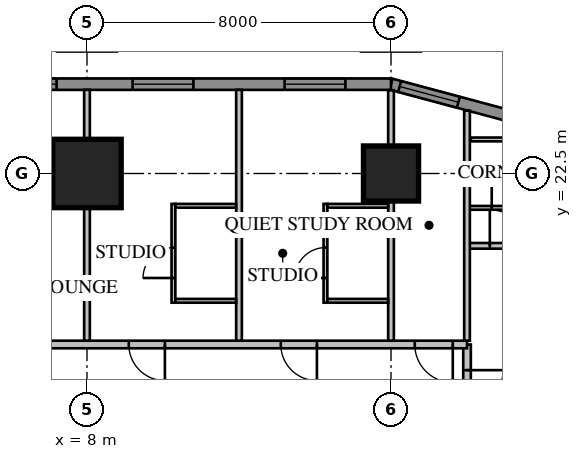
"""IFC4 building model, lengths in metres.
Left out: names, types, materials, properties, quantities, classifications, styles, units other than length and angle.
Written with IfcOpenShell. Run it as: python <this file> out.ifc"""

import sys

from ifc_helpers import new_model, si_unit, direction, frame, frame_2d, origin, origin_2d, place, context, subcontext, project, spatial, rectangle, extrude, element, fill, save


model = new_model("IFC4")
c1 = context("Model", 3, precision=1e-05, world=origin(), true_north=direction((0.0, 1.0)))
c2 = subcontext(c1, "Body", "Model", "MODEL_VIEW")
j1 = project(units=[si_unit("LENGTHUNIT", "METRE"), si_unit("PLANEANGLEUNIT", "RADIAN")], contexts=[c1])
p1 = place(None, origin())
s1 = spatial("IfcSite", under=j1, at=p1, CompositionType="ELEMENT")
p2 = place(p1, origin())
s2 = spatial("IfcBuilding", under=s1, at=p2, CompositionType="ELEMENT")
p3 = place(p2, frame((0.0, 0.0, 46.8)))
s3 = spatial("IfcBuildingStorey", under=s2, at=p3, CompositionType="ELEMENT", Elevation=46.8)
p4 = place(p3, frame((16.0, 22.5, 0.0), z_axis=(0.0, 0.0, 1.0), x_axis=(1.0, 0.0, 0.0)))
e1 = element("IfcColumn", 1, at=p4, inside=s3, PredefinedType="COLUMN", context=c2, shape_type="SweptSolid", body=[
    extrude(rectangle(XDim=1.45, YDim=1.45, at=origin_2d()), origin(), (0.0, 0.0, 1.0), 3.85),
])
p5 = place(p3, frame((8.0, 22.5, 0.0), z_axis=(0.0, 0.0, 1.0), x_axis=(1.0, 0.0, 0.0)))
e2 = element("IfcColumn", 2, at=p5, inside=s3, PredefinedType="COLUMN", context=c2, shape_type="SweptSolid", body=[
    extrude(rectangle(XDim=1.8, YDim=1.8, at=origin_2d()), origin(), (0.0, 0.0, 1.0), 3.85),
])
p6 = place(p3, frame((20.425, 23.664, 0.0), z_axis=(0.0, 0.0, 1.0), x_axis=(-0.965920218567, 0.258839972501, 0.0)))
e3 = element("IfcWall", 3, at=p6, inside=s3, PredefinedType="SOLIDWALL", context=c2, shape_type="SweptSolid", body=[
    extrude(rectangle(XDim=4.581, YDim=0.3, at=frame_2d((2.291, 0.0))), origin(), (0.0, 0.0, 1.0), 3.65),
])
p7 = place(p6, frame((2.746, 0.0, 0.75)))
e4 = element("IfcOpeningElement", 4, at=p7, cuts=e3, PredefinedType="OPENING", context=c2, shape_type="SweptSolid", body=[
    extrude(rectangle(XDim=1.6, YDim=1.8, at=frame_2d((0.8, 0.9))), frame((0.0, 0.17, 0.0), z_axis=(0.0, -1.0, 0.0), x_axis=(1.0, 0.0, 0.0)), (0.0, 0.0, 1.0), 0.34),
])
p8 = place(p3, frame((16.0, 24.85, 0.0), z_axis=(0.0, 0.0, 1.0), x_axis=(-1.0, 0.0, 0.0)))
e5 = element("IfcWall", 5, at=p8, inside=s3, PredefinedType="SOLIDWALL", context=c2, shape_type="SweptSolid", body=[
    extrude(rectangle(XDim=32.0, YDim=0.3, at=frame_2d((16.0, 0.0))), origin(), (0.0, 0.0, 1.0), 3.65),
])
p9 = place(p8, frame((1.2, 0.0, 0.75)))
e6 = element("IfcOpeningElement", 6, at=p9, cuts=e5, PredefinedType="OPENING", context=c2, shape_type="SweptSolid", body=[
    extrude(rectangle(XDim=1.6, YDim=1.8, at=frame_2d((0.8, 0.9))), frame((0.0, 0.17, 0.0), z_axis=(0.0, -1.0, 0.0), x_axis=(1.0, 0.0, 0.0)), (0.0, 0.0, 1.0), 0.34),
])
p10 = place(p8, frame((5.2, 0.0, 0.75)))
e7 = element("IfcOpeningElement", 7, at=p10, cuts=e5, PredefinedType="OPENING", context=c2, shape_type="SweptSolid", body=[
    extrude(rectangle(XDim=1.6, YDim=1.8, at=frame_2d((0.8, 0.9))), frame((0.0, 0.17, 0.0), z_axis=(0.0, -1.0, 0.0), x_axis=(1.0, 0.0, 0.0)), (0.0, 0.0, 1.0), 0.34),
])
p11 = place(p8, frame((17.2, 0.0, 0.75)))
e8 = element("IfcOpeningElement", 8, at=p11, cuts=e5, PredefinedType="OPENING", context=c2, shape_type="SweptSolid", body=[
    extrude(rectangle(XDim=1.6, YDim=1.8, at=frame_2d((0.8, 0.9))), frame((0.0, 0.17, 0.0), z_axis=(0.0, -1.0, 0.0), x_axis=(1.0, 0.0, 0.0)), (0.0, 0.0, 1.0), 0.34),
])
p12 = place(p8, frame((21.2, 0.0, 0.75)))
e9 = element("IfcOpeningElement", 9, at=p12, cuts=e5, PredefinedType="OPENING", context=c2, shape_type="SweptSolid", body=[
    extrude(rectangle(XDim=1.6, YDim=1.8, at=frame_2d((0.8, 0.9))), frame((0.0, 0.17, 0.0), z_axis=(0.0, -1.0, 0.0), x_axis=(1.0, 0.0, 0.0)), (0.0, 0.0, 1.0), 0.34),
])
p13 = place(p8, frame((25.2, 0.0, 0.75)))
e10 = element("IfcOpeningElement", 10, at=p13, cuts=e5, PredefinedType="OPENING", context=c2, shape_type="SweptSolid", body=[
    extrude(rectangle(XDim=1.6, YDim=1.8, at=frame_2d((0.8, 0.9))), frame((0.0, 0.17, 0.0), z_axis=(0.0, -1.0, 0.0), x_axis=(1.0, 0.0, 0.0)), (0.0, 0.0, 1.0), 0.34),
])
p14 = place(p8, frame((29.2, 0.0, 0.75)))
e11 = element("IfcOpeningElement", 11, at=p14, cuts=e5, PredefinedType="OPENING", context=c2, shape_type="SweptSolid", body=[
    extrude(rectangle(XDim=1.6, YDim=1.8, at=frame_2d((0.8, 0.9))), frame((0.0, 0.17, 0.0), z_axis=(0.0, -1.0, 0.0), x_axis=(1.0, 0.0, 0.0)), (0.0, 0.0, 1.0), 0.34),
])
p15 = place(p8, frame((8.8, 0.0, 0.75)))
e12 = element("IfcOpeningElement", 12, at=p15, cuts=e5, PredefinedType="OPENING", context=c2, shape_type="SweptSolid", body=[
    extrude(rectangle(XDim=2.4, YDim=1.8, at=frame_2d((1.2, 0.9))), frame((0.0, 0.17, 0.0), z_axis=(0.0, -1.0, 0.0), x_axis=(1.0, 0.0, 0.0)), (0.0, 0.0, 1.0), 0.34),
])
p16 = place(p8, frame((13.812, 0.0, 0.0)))
e13 = element("IfcOpeningElement", 13, at=p16, cuts=e5, PredefinedType="OPENING", context=c2, shape_type="SweptSolid", body=[
    extrude(rectangle(XDim=1.0, YDim=2.4, at=frame_2d((0.5, 1.2))), frame((0.0, 0.17, 0.0), z_axis=(0.0, -1.0, 0.0), x_axis=(1.0, 0.0, 0.0)), (0.0, 0.0, 1.0), 0.34),
])
p17 = place(p3, frame((18.0, -18.0, 0.0), z_axis=(0.0, 0.0, 1.0), x_axis=(0.0, 1.0, 0.0)))
e14 = element("IfcWall", 14, at=p17, inside=s3, PredefinedType="PARTITIONING", context=c2, shape_type="SweptSolid", body=[
    extrude(rectangle(XDim=36.0, YDim=0.2, at=frame_2d((18.0, 0.0))), origin(), (0.0, 0.0, 1.0), 3.65),
])
p18 = place(p17, frame((10.4, 0.0, 0.0)))
e15 = element("IfcOpeningElement", 15, at=p18, cuts=e14, PredefinedType="OPENING", context=c2, shape_type="SweptSolid", body=[
    extrude(rectangle(XDim=1.0, YDim=2.1, at=frame_2d((0.5, 1.05))), frame((0.0, 0.12, 0.0), z_axis=(0.0, -1.0, 0.0), x_axis=(1.0, 0.0, 0.0)), (0.0, 0.0, 1.0), 0.24),
])
p19 = place(p17, frame((14.4, 0.0, 0.0)))
e16 = element("IfcOpeningElement", 16, at=p19, cuts=e14, PredefinedType="OPENING", context=c2, shape_type="SweptSolid", body=[
    extrude(rectangle(XDim=1.0, YDim=2.1, at=frame_2d((0.5, 1.05))), frame((0.0, 0.12, 0.0), z_axis=(0.0, -1.0, 0.0), x_axis=(1.0, 0.0, 0.0)), (0.0, 0.0, 1.0), 0.24),
])
p20 = place(p17, frame((0.375, 0.0, 0.0)))
e17 = element("IfcOpeningElement", 17, at=p20, cuts=e14, PredefinedType="OPENING", context=c2, shape_type="SweptSolid", body=[
    extrude(rectangle(XDim=1.0, YDim=2.1, at=frame_2d((0.5, 1.05))), frame((0.0, 0.12, 0.0), z_axis=(0.0, -1.0, 0.0), x_axis=(1.0, 0.0, 0.0)), (0.0, 0.0, 1.0), 0.24),
])
p21 = place(p17, frame((34.375, 0.0, 0.0)))
e18 = element("IfcOpeningElement", 18, at=p21, cuts=e14, PredefinedType="OPENING", context=c2, shape_type="SweptSolid", body=[
    extrude(rectangle(XDim=0.95, YDim=2.1, at=frame_2d((0.475, 1.05))), frame((0.0, 0.12, 0.0), z_axis=(0.0, -1.0, 0.0), x_axis=(1.0, 0.0, 0.0)), (0.0, 0.0, 1.0), 0.24),
])
p22 = place(p3, frame((18.065, 21.596, 0.0), z_axis=(0.0, 0.0, 1.0), x_axis=(1.0, 0.0, 0.0)))
e19 = element("IfcWall", 19, at=p22, inside=s3, PredefinedType="PARTITIONING", context=c2, shape_type="SweptSolid", body=[
    extrude(rectangle(XDim=2.335, YDim=0.1, at=frame_2d((1.167, 0.0))), origin(), (0.0, 0.0, 1.0), 3.65),
])
p23 = place(p22, frame((0.585, 0.0, 0.0)))
e20 = element("IfcOpeningElement", 20, at=p23, cuts=e19, PredefinedType="OPENING", context=c2, shape_type="SweptSolid", body=[
    extrude(rectangle(XDim=0.8, YDim=2.1, at=frame_2d((0.4, 1.05))), frame((0.0, 0.07, 0.0), z_axis=(0.0, -1.0, 0.0), x_axis=(1.0, 0.0, 0.0)), (0.0, 0.0, 1.0), 0.14),
])
p24 = place(p3, frame((18.1, 23.396, 0.0), z_axis=(0.0, 0.0, 1.0), x_axis=(1.0, 0.0, 0.0)))
e21 = element("IfcWall", 21, at=p24, inside=s3, PredefinedType="PARTITIONING", context=c2, shape_type="SweptSolid", body=[
    extrude(rectangle(XDim=2.3, YDim=0.1, at=frame_2d((1.15, 0.0))), origin(), (0.0, 0.0, 1.0), 3.65),
])
p25 = place(p3, frame((18.065, 20.596, 0.0), z_axis=(0.0, 0.0, 1.0), x_axis=(1.0, 0.0, 0.0)))
e22 = element("IfcWall", 22, at=p25, inside=s3, PredefinedType="PARTITIONING", context=c2, shape_type="SweptSolid", body=[
    extrude(rectangle(XDim=5.209, YDim=0.15, at=frame_2d((2.604, 0.0))), origin(), (0.0, 0.0, 1.0), 3.65),
])
p26 = place(p25, frame((0.535, 0.0, 0.0)))
e23 = element("IfcOpeningElement", 23, at=p26, cuts=e22, PredefinedType="OPENING", context=c2, shape_type="SweptSolid", body=[
    extrude(rectangle(XDim=0.95, YDim=2.1, at=frame_2d((0.475, 1.05))), frame((0.0, 0.095, 0.0), z_axis=(0.0, -1.0, 0.0), x_axis=(1.0, 0.0, 0.0)), (0.0, 0.0, 1.0), 0.19),
])
p27 = place(p3, frame((18.0, 18.0, 0.0), z_axis=(0.0, 0.0, 1.0), x_axis=(-1.0, 0.0, 0.0)))
e24 = element("IfcWall", 24, at=p27, inside=s3, PredefinedType="PARTITIONING", context=c2, shape_type="SweptSolid", body=[
    extrude(rectangle(XDim=36.0, YDim=0.2, at=frame_2d((18.0, 0.0))), origin(), (0.0, 0.0, 1.0), 3.65),
])
p28 = place(p27, frame((0.375, 0.0, 0.0)))
e25 = element("IfcOpeningElement", 25, at=p28, cuts=e24, PredefinedType="OPENING", context=c2, shape_type="SweptSolid", body=[
    extrude(rectangle(XDim=1.0, YDim=2.1, at=frame_2d((0.5, 1.05))), frame((0.0, 0.12, 0.0), z_axis=(0.0, -1.0, 0.0), x_axis=(1.0, 0.0, 0.0)), (0.0, 0.0, 1.0), 0.24),
])
p29 = place(p27, frame((3.95, 0.0, 0.0)))
e26 = element("IfcOpeningElement", 26, at=p29, cuts=e24, PredefinedType="OPENING", context=c2, shape_type="SweptSolid", body=[
    extrude(rectangle(XDim=0.95, YDim=2.1, at=frame_2d((0.475, 1.05))), frame((0.0, 0.12, 0.0), z_axis=(0.0, -1.0, 0.0), x_axis=(1.0, 0.0, 0.0)), (0.0, 0.0, 1.0), 0.24),
])
p30 = place(p27, frame((7.95, 0.0, 0.0)))
e27 = element("IfcOpeningElement", 27, at=p30, cuts=e24, PredefinedType="OPENING", context=c2, shape_type="SweptSolid", body=[
    extrude(rectangle(XDim=0.95, YDim=2.1, at=frame_2d((0.475, 1.05))), frame((0.0, 0.12, 0.0), z_axis=(0.0, -1.0, 0.0), x_axis=(1.0, 0.0, 0.0)), (0.0, 0.0, 1.0), 0.24),
])
p31 = place(p27, frame((19.95, 0.0, 0.0)))
e28 = element("IfcOpeningElement", 28, at=p31, cuts=e24, PredefinedType="OPENING", context=c2, shape_type="SweptSolid", body=[
    extrude(rectangle(XDim=0.95, YDim=2.1, at=frame_2d((0.475, 1.05))), frame((0.0, 0.12, 0.0), z_axis=(0.0, -1.0, 0.0), x_axis=(1.0, 0.0, 0.0)), (0.0, 0.0, 1.0), 0.24),
])
p32 = place(p27, frame((23.95, 0.0, 0.0)))
e29 = element("IfcOpeningElement", 29, at=p32, cuts=e24, PredefinedType="OPENING", context=c2, shape_type="SweptSolid", body=[
    extrude(rectangle(XDim=0.95, YDim=2.1, at=frame_2d((0.475, 1.05))), frame((0.0, 0.12, 0.0), z_axis=(0.0, -1.0, 0.0), x_axis=(1.0, 0.0, 0.0)), (0.0, 0.0, 1.0), 0.24),
])
p33 = place(p27, frame((27.95, 0.0, 0.0)))
e30 = element("IfcOpeningElement", 30, at=p33, cuts=e24, PredefinedType="OPENING", context=c2, shape_type="SweptSolid", body=[
    extrude(rectangle(XDim=0.95, YDim=2.1, at=frame_2d((0.475, 1.05))), frame((0.0, 0.12, 0.0), z_axis=(0.0, -1.0, 0.0), x_axis=(1.0, 0.0, 0.0)), (0.0, 0.0, 1.0), 0.24),
])
p34 = place(p27, frame((31.95, 0.0, 0.0)))
e31 = element("IfcOpeningElement", 31, at=p34, cuts=e24, PredefinedType="OPENING", context=c2, shape_type="SweptSolid", body=[
    extrude(rectangle(XDim=0.95, YDim=2.1, at=frame_2d((0.475, 1.05))), frame((0.0, 0.12, 0.0), z_axis=(0.0, -1.0, 0.0), x_axis=(1.0, 0.0, 0.0)), (0.0, 0.0, 1.0), 0.24),
])
p35 = place(p27, frame((34.375, 0.0, 0.0)))
e32 = element("IfcOpeningElement", 32, at=p35, cuts=e24, PredefinedType="OPENING", context=c2, shape_type="SweptSolid", body=[
    extrude(rectangle(XDim=0.95, YDim=2.1, at=frame_2d((0.475, 1.05))), frame((0.0, 0.12, 0.0), z_axis=(0.0, -1.0, 0.0), x_axis=(1.0, 0.0, 0.0)), (0.0, 0.0, 1.0), 0.24),
])
p36 = place(p27, frame((11.2, 0.0, 0.0)))
e33 = element("IfcOpeningElement", 33, at=p36, cuts=e24, PredefinedType="OPENING", context=c2, shape_type="SweptSolid", body=[
    extrude(rectangle(XDim=1.0, YDim=2.1, at=frame_2d((0.5, 1.05))), frame((0.0, 0.12, 0.0), z_axis=(0.0, -1.0, 0.0), x_axis=(1.0, 0.0, 0.0)), (0.0, 0.0, 1.0), 0.24),
])
p37 = place(p27, frame((15.2, 0.0, 0.0)))
e34 = element("IfcOpeningElement", 34, at=p37, cuts=e24, PredefinedType="OPENING", context=c2, shape_type="SweptSolid", body=[
    extrude(rectangle(XDim=1.0, YDim=2.1, at=frame_2d((0.5, 1.05))), frame((0.0, 0.12, 0.0), z_axis=(0.0, -1.0, 0.0), x_axis=(1.0, 0.0, 0.0)), (0.0, 0.0, 1.0), 0.24),
])
p38 = place(p3, frame((18.0, 18.1, 0.0), z_axis=(0.0, 0.0, 1.0), x_axis=(0.0, 1.0, 0.0)))
e35 = element("IfcWall", 35, at=p38, inside=s3, PredefinedType="PARTITIONING", context=c2, shape_type="SweptSolid", body=[
    extrude(rectangle(XDim=6.053, YDim=0.15, at=frame_2d((3.027, 0.0))), origin(), (0.0, 0.0, 1.0), 3.65),
])
p39 = place(p3, frame((16.0, 18.1, 0.0), z_axis=(0.0, 0.0, 1.0), x_axis=(0.0, 1.0, 0.0)))
e36 = element("IfcWall", 36, at=p39, inside=s3, PredefinedType="PARTITIONING", context=c2, shape_type="SweptSolid", body=[
    extrude(rectangle(XDim=6.589, YDim=0.15, at=frame_2d((3.295, 0.0))), origin(), (0.0, 0.0, 1.0), 3.65),
])
for number, where, z_axis, x_axis in (
    (37, (12.0, 18.1, 0.0), (0.0, 0.0, 1.0), (0.0, 1.0, 0.0)),
    (38, (8.0, 18.1, 0.0), (0.0, 0.0, 1.0), (0.0, 1.0, 0.0)),
):
    element("IfcWall", number, at=place(p3, frame(where, z_axis=z_axis, x_axis=x_axis)), inside=s3, PredefinedType="PARTITIONING", context=c2, shape_type="SweptSolid", body=[
        extrude(rectangle(XDim=6.6, YDim=0.15, at=frame_2d((3.3, 0.0))), origin(), (0.0, 0.0, 1.0), 3.65),
    ])
p40 = place(p3, frame((14.275, 19.1, 0.0), z_axis=(0.0, 0.0, 1.0), x_axis=(0.0, 1.0, 0.0)))
e39 = element("IfcWall", 39, at=p40, inside=s3, PredefinedType="PARTITIONING", context=c2, shape_type="SweptSolid", body=[
    extrude(rectangle(XDim=2.6, YDim=0.1, at=frame_2d((1.3, 0.0))), origin(), (0.0, 0.0, 1.0), 3.65),
])
p41 = place(p40, frame((0.65, 0.0, 0.0)))
e40 = element("IfcOpeningElement", 40, at=p41, cuts=e39, PredefinedType="OPENING", context=c2, shape_type="SweptSolid", body=[
    extrude(rectangle(XDim=0.8, YDim=2.1, at=frame_2d((0.4, 1.05))), frame((0.0, 0.07, 0.0), z_axis=(0.0, -1.0, 0.0), x_axis=(1.0, 0.0, 0.0)), (0.0, 0.0, 1.0), 0.14),
])
p42 = place(p3, frame((15.925, 21.65, 0.0), z_axis=(0.0, 0.0, 1.0), x_axis=(-1.0, 0.0, 0.0)))
e41 = element("IfcWall", 41, at=p42, inside=s3, PredefinedType="PARTITIONING", context=c2, shape_type="SweptSolid", body=[
    extrude(rectangle(XDim=1.6, YDim=0.1, at=frame_2d((0.8, 0.0))), origin(), (0.0, 0.0, 1.0), 3.65),
])
p43 = place(p3, frame((15.925, 19.15, 0.0), z_axis=(0.0, 0.0, 1.0), x_axis=(-1.0, 0.0, 0.0)))
e42 = element("IfcWall", 42, at=p43, inside=s3, PredefinedType="PARTITIONING", context=c2, shape_type="SweptSolid", body=[
    extrude(rectangle(XDim=1.6, YDim=0.1, at=frame_2d((0.8, 0.0))), origin(), (0.0, 0.0, 1.0), 3.122),
])
p44 = place(p3, frame((10.275, 19.1, 0.0), z_axis=(0.0, 0.0, 1.0), x_axis=(0.0, 1.0, 0.0)))
e43 = element("IfcWall", 43, at=p44, inside=s3, PredefinedType="PARTITIONING", context=c2, shape_type="SweptSolid", body=[
    extrude(rectangle(XDim=2.6, YDim=0.1, at=frame_2d((1.3, 0.0))), origin(), (0.0, 0.0, 1.0), 3.65),
])
p45 = place(p44, frame((0.65, 0.0, 0.0)))
e44 = element("IfcOpeningElement", 44, at=p45, cuts=e43, PredefinedType="OPENING", context=c2, shape_type="SweptSolid", body=[
    extrude(rectangle(XDim=0.8, YDim=2.1, at=frame_2d((0.4, 1.05))), frame((0.0, 0.07, 0.0), z_axis=(0.0, -1.0, 0.0), x_axis=(1.0, 0.0, 0.0)), (0.0, 0.0, 1.0), 0.14),
])
p46 = place(p3, frame((11.925, 21.65, 0.0), z_axis=(0.0, 0.0, 1.0), x_axis=(-1.0, 0.0, 0.0)))
e45 = element("IfcWall", 45, at=p46, inside=s3, PredefinedType="PARTITIONING", context=c2, shape_type="SweptSolid", body=[
    extrude(rectangle(XDim=1.6, YDim=0.1, at=frame_2d((0.8, 0.0))), origin(), (0.0, 0.0, 1.0), 3.65),
])
p47 = place(p3, frame((11.925, 19.15, 0.0), z_axis=(0.0, 0.0, 1.0), x_axis=(-1.0, 0.0, 0.0)))
e46 = element("IfcWall", 46, at=p47, inside=s3, PredefinedType="PARTITIONING", context=c2, shape_type="SweptSolid", body=[
    extrude(rectangle(XDim=1.6, YDim=0.1, at=frame_2d((0.8, 0.0))), origin(), (0.0, 0.0, 1.0), 3.122),
])
p48 = place(p7, origin())
e47 = element("IfcWindow", 47, at=p48, inside=s3, PartitioningType="SINGLE_PANEL", PredefinedType="WINDOW", context=c2, shape_type="SweptSolid", body=[
    extrude(rectangle(XDim=1.6, YDim=1.8, at=frame_2d((0.8, 0.9))), frame((0.0, 0.03, 0.0), z_axis=(0.0, -1.0, 0.0), x_axis=(1.0, 0.0, 0.0)), (0.0, 0.0, 1.0), 0.06),
])
fill(e4, e47)
p49 = place(p9, origin())
e48 = element("IfcWindow", 48, at=p49, inside=s3, PartitioningType="SINGLE_PANEL", PredefinedType="WINDOW", context=c2, shape_type="SweptSolid", body=[
    extrude(rectangle(XDim=1.6, YDim=1.8, at=frame_2d((0.8, 0.9))), frame((0.0, 0.03, 0.0), z_axis=(0.0, -1.0, 0.0), x_axis=(1.0, 0.0, 0.0)), (0.0, 0.0, 1.0), 0.06),
])
fill(e6, e48)
p50 = place(p10, origin())
e49 = element("IfcWindow", 49, at=p50, inside=s3, PartitioningType="SINGLE_PANEL", PredefinedType="WINDOW", context=c2, shape_type="SweptSolid", body=[
    extrude(rectangle(XDim=1.6, YDim=1.8, at=frame_2d((0.8, 0.9))), frame((0.0, 0.03, 0.0), z_axis=(0.0, -1.0, 0.0), x_axis=(1.0, 0.0, 0.0)), (0.0, 0.0, 1.0), 0.06),
])
fill(e7, e49)
p51 = place(p15, origin())
e50 = element("IfcWindow", 50, at=p51, inside=s3, PartitioningType="SINGLE_PANEL", PredefinedType="WINDOW", context=c2, shape_type="SweptSolid", body=[
    extrude(rectangle(XDim=2.4, YDim=1.8, at=frame_2d((1.2, 0.9))), frame((0.0, 0.03, 0.0), z_axis=(0.0, -1.0, 0.0), x_axis=(1.0, 0.0, 0.0)), (0.0, 0.0, 1.0), 0.06),
])
fill(e12, e50)
p52 = place(p21, origin())
e51 = element("IfcDoor", 51, at=p52, inside=s3, OperationType="SINGLE_SWING_RIGHT", PredefinedType="DOOR", context=c2, shape_type="SweptSolid", body=[
    extrude(rectangle(XDim=0.95, YDim=2.1, at=frame_2d((0.475, 1.05))), frame((0.0, 0.025, 0.0), z_axis=(0.0, -1.0, 0.0), x_axis=(1.0, 0.0, 0.0)), (0.0, 0.0, 1.0), 0.05),
])
fill(e18, e51)
p53 = place(p23, origin())
e52 = element("IfcDoor", 52, at=p53, inside=s3, OperationType="SINGLE_SWING_LEFT", PredefinedType="DOOR", context=c2, shape_type="SweptSolid", body=[
    extrude(rectangle(XDim=0.8, YDim=2.1, at=frame_2d((0.4, 1.05))), frame((0.0, 0.025, 0.0), z_axis=(0.0, -1.0, 0.0), x_axis=(1.0, 0.0, 0.0)), (0.0, 0.0, 1.0), 0.05),
])
fill(e20, e52)
p54 = place(p26, origin())
e53 = element("IfcDoor", 53, at=p54, inside=s3, OperationType="SINGLE_SWING_LEFT", PredefinedType="DOOR", context=c2, shape_type="SweptSolid", body=[
    extrude(rectangle(XDim=0.95, YDim=2.1, at=frame_2d((0.475, 1.05))), frame((0.0, 0.025, 0.0), z_axis=(0.0, -1.0, 0.0), x_axis=(1.0, 0.0, 0.0)), (0.0, 0.0, 1.0), 0.05),
])
fill(e23, e53)
p55 = place(p28, origin())
e54 = element("IfcDoor", 54, at=p55, inside=s3, OperationType="SINGLE_SWING_LEFT", PredefinedType="DOOR", context=c2, shape_type="SweptSolid", body=[
    extrude(rectangle(XDim=1.0, YDim=2.1, at=frame_2d((0.5, 1.05))), frame((0.0, 0.025, 0.0), z_axis=(0.0, -1.0, 0.0), x_axis=(1.0, 0.0, 0.0)), (0.0, 0.0, 1.0), 0.05),
])
fill(e25, e54)
p56 = place(p29, origin())
e55 = element("IfcDoor", 55, at=p56, inside=s3, OperationType="SINGLE_SWING_LEFT", PredefinedType="DOOR", context=c2, shape_type="SweptSolid", body=[
    extrude(rectangle(XDim=0.95, YDim=2.1, at=frame_2d((0.475, 1.05))), frame((0.0, 0.025, 0.0), z_axis=(0.0, -1.0, 0.0), x_axis=(1.0, 0.0, 0.0)), (0.0, 0.0, 1.0), 0.05),
])
fill(e26, e55)
p57 = place(p41, origin())
e56 = element("IfcDoor", 56, at=p57, inside=s3, OperationType="SINGLE_SWING_LEFT", PredefinedType="DOOR", context=c2, shape_type="SweptSolid", body=[
    extrude(rectangle(XDim=0.8, YDim=2.1, at=frame_2d((0.4, 1.05))), frame((0.0, 0.025, 0.0), z_axis=(0.0, -1.0, 0.0), x_axis=(1.0, 0.0, 0.0)), (0.0, 0.0, 1.0), 0.05),
])
fill(e40, e56)
p58 = place(p30, origin())
e57 = element("IfcDoor", 57, at=p58, inside=s3, OperationType="SINGLE_SWING_LEFT", PredefinedType="DOOR", context=c2, shape_type="SweptSolid", body=[
    extrude(rectangle(XDim=0.95, YDim=2.1, at=frame_2d((0.475, 1.05))), frame((0.0, 0.025, 0.0), z_axis=(0.0, -1.0, 0.0), x_axis=(1.0, 0.0, 0.0)), (0.0, 0.0, 1.0), 0.05),
])
fill(e27, e57)
p59 = place(p45, origin())
e58 = element("IfcDoor", 58, at=p59, inside=s3, OperationType="SINGLE_SWING_LEFT", PredefinedType="DOOR", context=c2, shape_type="SweptSolid", body=[
    extrude(rectangle(XDim=0.8, YDim=2.1, at=frame_2d((0.4, 1.05))), frame((0.0, 0.025, 0.0), z_axis=(0.0, -1.0, 0.0), x_axis=(1.0, 0.0, 0.0)), (0.0, 0.0, 1.0), 0.05),
])
fill(e44, e58)
save(model, sys.argv[1])
